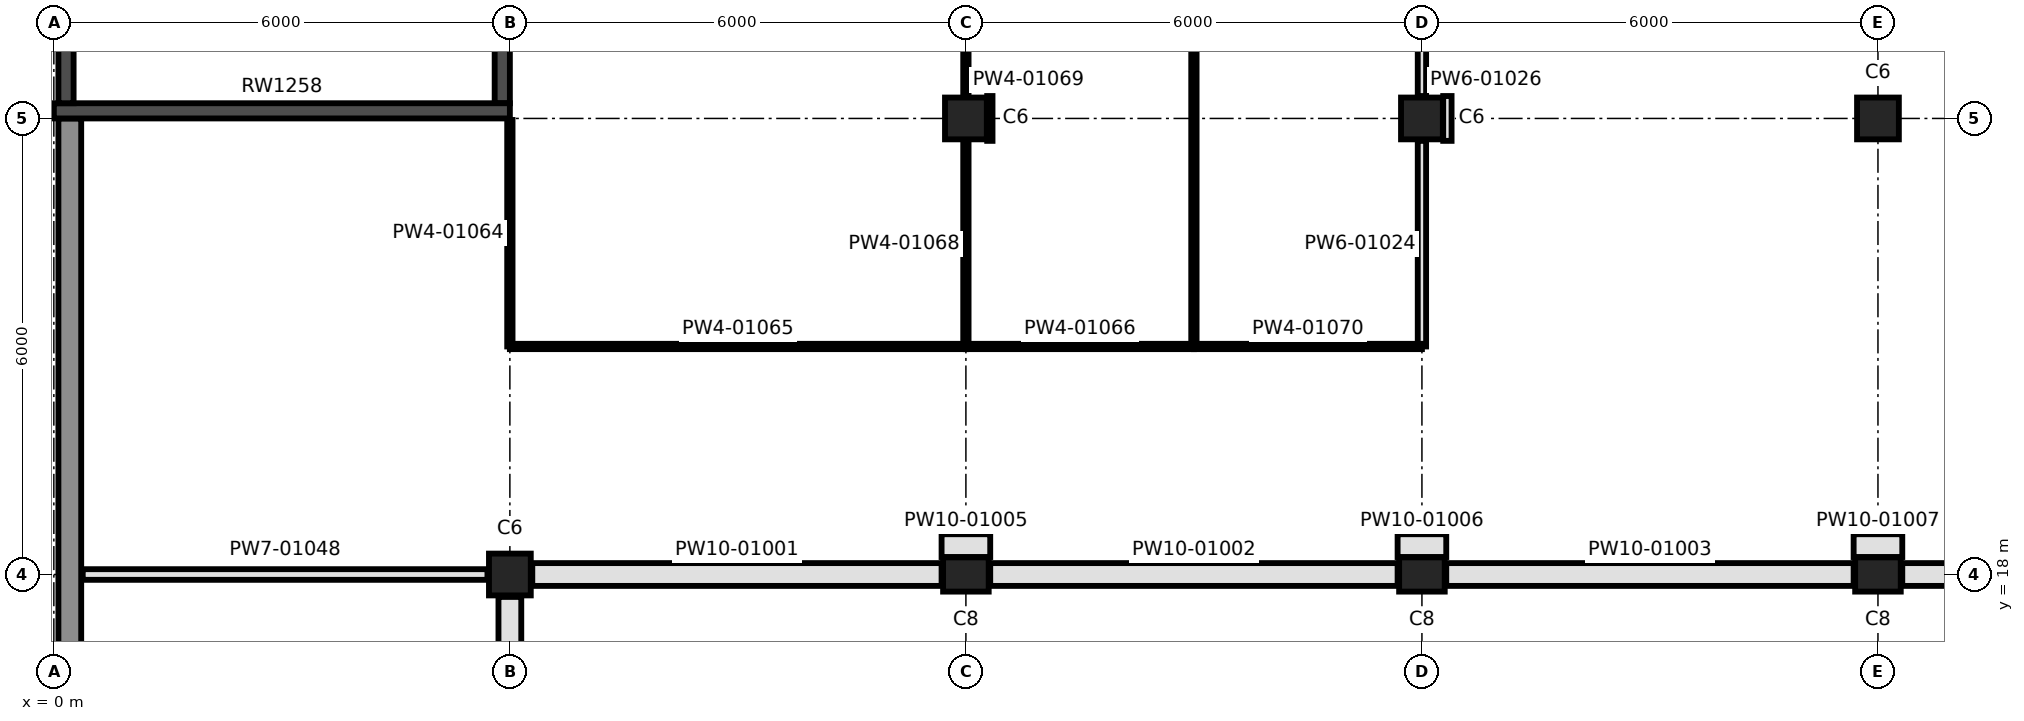
"""IFC4 building model, lengths in metres.
Left out: names, types, materials, properties, quantities, classifications, styles, units other than length and angle.
Written with IfcOpenShell. Run it as: python <this file> out.ifc"""

import sys

from ifc_helpers import new_model, si_unit, direction, frame, frame_2d, origin, origin_2d, place, context, subcontext, project, spatial, rectangle, extrude, element, fill, save


model = new_model("IFC4")
c1 = context("Model", 3, precision=1e-05, world=origin(), true_north=direction((0.0, 1.0)))
c2 = subcontext(c1, "Body", "Model", "MODEL_VIEW")
j1 = project(units=[si_unit("LENGTHUNIT", "METRE"), si_unit("PLANEANGLEUNIT", "RADIAN")], contexts=[c1])
p1 = place(None, origin())
s1 = spatial("IfcSite", under=j1, at=p1, CompositionType="ELEMENT")
p2 = place(p1, origin())
s2 = spatial("IfcBuilding", under=s1, at=p2, CompositionType="ELEMENT")
p3 = place(p2, frame((0.0, 0.0, 7.0)))
s3 = spatial("IfcBuildingStorey", under=s2, at=p3, CompositionType="ELEMENT", Elevation=7.0)
p4 = place(p3, frame((6.0, 18.0, 0.0), z_axis=(0.0, 0.0, 1.0), x_axis=(1.0, 0.0, 0.0)))
e1 = element("IfcColumn", 1, at=p4, inside=s3, PredefinedType="COLUMN", context=c2, shape_type="SweptSolid", body=[
    extrude(rectangle(XDim=0.55, YDim=0.55, at=origin_2d()), origin(), (0.0, 0.0, 1.0), 5.0),
])
for number, where, z_axis, x_axis in (
    (2, (12.0, 18.0, 0.0), (0.0, 0.0, 1.0), (1.0, 0.0, 0.0)),
    (3, (18.0, 18.0, 0.0), (0.0, 0.0, 1.0), (1.0, 0.0, 0.0)),
    (4, (24.0, 18.0, 0.0), (0.0, 0.0, 1.0), (1.0, 0.0, 0.0)),
):
    element("IfcColumn", number, at=place(p3, frame(where, z_axis=z_axis, x_axis=x_axis)), inside=s3, PredefinedType="COLUMN", context=c2, shape_type="SweptSolid", body=[
        extrude(rectangle(XDim=0.6, YDim=0.45, at=origin_2d()), origin(), (0.0, 0.0, 1.0), 5.0),
    ])
for number, where, z_axis, x_axis in (
    (5, (12.0, 24.0, 0.0), (0.0, 0.0, 1.0), (1.0, 0.0, 0.0)),
    (6, (18.0, 24.0, 0.0), (0.0, 0.0, 1.0), (1.0, 0.0, 0.0)),
    (7, (24.0, 24.0, 0.0), (0.0, 0.0, 1.0), (1.0, 0.0, 0.0)),
):
    element("IfcColumn", number, at=place(p3, frame(where, z_axis=z_axis, x_axis=x_axis)), inside=s3, PredefinedType="COLUMN", context=c2, shape_type="SweptSolid", body=[
        extrude(rectangle(XDim=0.55, YDim=0.55, at=origin_2d()), origin(), (0.0, 0.0, 1.0), 5.0),
    ])
p5 = place(p3, frame((0.0, 24.1, 0.0), z_axis=(0.0, 0.0, 1.0), x_axis=(1.0, 0.0, 0.0)))
e8 = element("IfcWall", 8, at=p5, inside=s3, PredefinedType="SHEAR", context=c2, shape_type="SweptSolid", body=[
    extrude(rectangle(XDim=6.0, YDim=0.2, at=frame_2d((3.0, 0.0))), origin(), (0.0, 0.0, 1.0), 5.0),
])
p6 = place(p5, frame((4.6, 0.0, 0.0)))
e9 = element("IfcOpeningElement", 9, at=p6, cuts=e8, PredefinedType="OPENING", context=c2, shape_type="SweptSolid", body=[
    extrude(rectangle(XDim=1.1, YDim=2.2, at=frame_2d((0.55, 1.1))), frame((0.0, 0.11, 0.0), z_axis=(0.0, -1.0, 0.0), x_axis=(1.0, 0.0, 0.0)), (0.0, 0.0, 1.0), 0.22),
])
p7 = place(p3, frame((0.16, 24.2, 0.0), z_axis=(0.0, 0.0, 1.0), x_axis=(0.0, 1.0, 0.0)))
e10 = element("IfcWall", 10, at=p7, inside=s3, PredefinedType="SHEAR", context=c2, shape_type="SweptSolid", body=[
    extrude(rectangle(XDim=5.6, YDim=0.2, at=frame_2d((2.8, 0.0))), origin(), (0.0, 0.0, 1.0), 5.0),
])
p8 = place(p7, frame((2.55, 0.0, 0.9)))
e11 = element("IfcOpeningElement", 11, at=p8, cuts=e10, PredefinedType="OPENING", context=c2, shape_type="SweptSolid", body=[
    extrude(rectangle(XDim=0.5, YDim=2.1, at=frame_2d((0.25, 1.05))), frame((0.0, 0.11, 0.0), z_axis=(0.0, -1.0, 0.0), x_axis=(1.0, 0.0, 0.0)), (0.0, 0.0, 1.0), 0.22),
])
p9 = place(p3, frame((5.9, 24.2, 0.0), z_axis=(0.0, 0.0, 1.0), x_axis=(0.0, 1.0, 0.0)))
e12 = element("IfcWall", 12, at=p9, inside=s3, PredefinedType="SHEAR", context=c2, shape_type="SweptSolid", body=[
    extrude(rectangle(XDim=5.6, YDim=0.2, at=frame_2d((2.8, 0.0))), origin(), (0.0, 0.0, 1.0), 5.0),
])
p10 = place(p3, frame((0.21, 6.0, 0.0), z_axis=(0.0, 0.0, 1.0), x_axis=(0.0, 1.0, 0.0)))
e13 = element("IfcWall", 13, at=p10, inside=s3, PredefinedType="SOLIDWALL", context=c2, shape_type="SweptSolid", body=[
    extrude(rectangle(XDim=18.0, YDim=0.3, at=frame_2d((9.0, 0.0))), origin(), (0.0, 0.0, 1.0), 5.0),
])
p11 = place(p3, frame((6.295, 18.0, 0.0), z_axis=(0.0, 0.0, 1.0), x_axis=(1.0, 0.0, 0.0)))
e14 = element("IfcWall", 14, at=p11, inside=s3, PredefinedType="PARTITIONING", context=c2, shape_type="SweptSolid", body=[
    extrude(rectangle(XDim=5.385, YDim=0.3, at=frame_2d((2.692, 0.0))), origin(), (0.0, 0.0, 1.0), 4.1),
])
p12 = place(p11, frame((1.755, 0.0, 0.0)))
e15 = element("IfcOpeningElement", 15, at=p12, cuts=e14, PredefinedType="OPENING", context=c2, shape_type="SweptSolid", body=[
    extrude(rectangle(XDim=1.8, YDim=2.1, at=frame_2d((0.9, 1.05))), frame((0.0, 0.16, 0.0), z_axis=(0.0, -1.0, 0.0), x_axis=(1.0, 0.0, 0.0)), (0.0, 0.0, 1.0), 0.32),
])
p13 = place(p3, frame((12.32, 18.0, 0.0), z_axis=(0.0, 0.0, 1.0), x_axis=(1.0, 0.0, 0.0)))
e16 = element("IfcWall", 16, at=p13, inside=s3, PredefinedType="PARTITIONING", context=c2, shape_type="SweptSolid", body=[
    extrude(rectangle(XDim=5.36, YDim=0.3, at=frame_2d((2.68, 0.0))), origin(), (0.0, 0.0, 1.0), 4.1),
])
p14 = place(p13, frame((1.73, 0.0, 0.0)))
e17 = element("IfcOpeningElement", 17, at=p14, cuts=e16, PredefinedType="OPENING", context=c2, shape_type="SweptSolid", body=[
    extrude(rectangle(XDim=1.8, YDim=2.1, at=frame_2d((0.9, 1.05))), frame((0.0, 0.16, 0.0), z_axis=(0.0, -1.0, 0.0), x_axis=(1.0, 0.0, 0.0)), (0.0, 0.0, 1.0), 0.32),
])
p15 = place(p3, frame((18.32, 18.0, 0.0), z_axis=(0.0, 0.0, 1.0), x_axis=(1.0, 0.0, 0.0)))
e18 = element("IfcWall", 18, at=p15, inside=s3, PredefinedType="PARTITIONING", context=c2, shape_type="SweptSolid", body=[
    extrude(rectangle(XDim=5.36, YDim=0.3, at=frame_2d((2.68, 0.0))), origin(), (0.0, 0.0, 1.0), 4.1),
])
p16 = place(p15, frame((1.73, 0.0, 0.0)))
e19 = element("IfcOpeningElement", 19, at=p16, cuts=e18, PredefinedType="OPENING", context=c2, shape_type="SweptSolid", body=[
    extrude(rectangle(XDim=1.8, YDim=2.1, at=frame_2d((0.9, 1.05))), frame((0.0, 0.16, 0.0), z_axis=(0.0, -1.0, 0.0), x_axis=(1.0, 0.0, 0.0)), (0.0, 0.0, 1.0), 0.32),
])
p17 = place(p3, frame((24.32, 18.0, 0.0), z_axis=(0.0, 0.0, 1.0), x_axis=(1.0, 0.0, 0.0)))
e20 = element("IfcWall", 20, at=p17, inside=s3, PredefinedType="PARTITIONING", context=c2, shape_type="SweptSolid", body=[
    extrude(rectangle(XDim=5.385, YDim=0.3, at=frame_2d((2.692, 0.0))), origin(), (0.0, 0.0, 1.0), 4.1),
])
p18 = place(p17, frame((1.73, 0.0, 0.0)))
e21 = element("IfcOpeningElement", 21, at=p18, cuts=e20, PredefinedType="OPENING", context=c2, shape_type="SweptSolid", body=[
    extrude(rectangle(XDim=1.8, YDim=2.1, at=frame_2d((0.9, 1.05))), frame((0.0, 0.16, 0.0), z_axis=(0.0, -1.0, 0.0), x_axis=(1.0, 0.0, 0.0)), (0.0, 0.0, 1.0), 0.32),
])
for number, where, z_axis, x_axis in (
    (22, (11.68, 18.38, 0.0), (0.0, 0.0, 1.0), (1.0, 0.0, 0.0)),
    (23, (17.68, 18.38, 0.0), (0.0, 0.0, 1.0), (1.0, 0.0, 0.0)),
    (24, (23.68, 18.38, 0.0), (0.0, 0.0, 1.0), (1.0, 0.0, 0.0)),
):
    element("IfcWall", number, at=place(p3, frame(where, z_axis=z_axis, x_axis=x_axis)), inside=s3, PredefinedType="PARTITIONING", context=c2, shape_type="SweptSolid", body=[
        extrude(rectangle(XDim=0.64, YDim=0.3, at=frame_2d((0.32, 0.0))), origin(), (0.0, 0.0, 1.0), 4.05),
    ])
p19 = place(p3, frame((6.0, 6.02, 0.0), z_axis=(0.0, 0.0, 1.0), x_axis=(0.0, 1.0, 0.0)))
e25 = element("IfcWall", 25, at=p19, inside=s3, PredefinedType="PARTITIONING", context=c2, shape_type="SweptSolid", body=[
    extrude(rectangle(XDim=11.685, YDim=0.3, at=frame_2d((5.843, 0.0))), origin(), (0.0, 0.0, 1.0), 4.1),
])
p20 = place(p19, frame((2.03, 0.0, 0.0)))
e26 = element("IfcOpeningElement", 26, at=p20, cuts=e25, PredefinedType="OPENING", context=c2, shape_type="SweptSolid", body=[
    extrude(rectangle(XDim=1.8, YDim=2.1, at=frame_2d((0.9, 1.05))), frame((0.0, 0.16, 0.0), z_axis=(0.0, -1.0, 0.0), x_axis=(1.0, 0.0, 0.0)), (0.0, 0.0, 1.0), 0.32),
])
p21 = place(p19, frame((8.03, 0.0, 0.0)))
e27 = element("IfcOpeningElement", 27, at=p21, cuts=e25, PredefinedType="OPENING", context=c2, shape_type="SweptSolid", body=[
    extrude(rectangle(XDim=1.8, YDim=2.1, at=frame_2d((0.9, 1.05))), frame((0.0, 0.16, 0.0), z_axis=(0.0, -1.0, 0.0), x_axis=(1.0, 0.0, 0.0)), (0.0, 0.0, 1.0), 0.32),
])
p22 = place(p3, frame((18.0, 21.0, 0.0), z_axis=(0.0, 0.0, 1.0), x_axis=(0.0, 1.0, 0.0)))
e28 = element("IfcWall", 28, at=p22, inside=s3, PredefinedType="PARTITIONING", context=c2, shape_type="SweptSolid", body=[
    extrude(rectangle(XDim=2.705, YDim=0.11, at=frame_2d((1.353, 0.0))), origin(), (0.0, 0.0, 1.0), 4.05),
])
p23 = place(p3, frame((18.0, 24.295, 0.0), z_axis=(0.0, 0.0, 1.0), x_axis=(0.0, 1.0, 0.0)))
e29 = element("IfcWall", 29, at=p23, inside=s3, PredefinedType="PARTITIONING", context=c2, shape_type="SweptSolid", body=[
    extrude(rectangle(XDim=5.685, YDim=0.11, at=frame_2d((2.843, 0.0))), origin(), (0.0, 0.0, 1.0), 4.05),
])
p24 = place(p23, frame((0.755, 0.0, 0.0)))
e30 = element("IfcOpeningElement", 30, at=p24, cuts=e29, PredefinedType="OPENING", context=c2, shape_type="SweptSolid", body=[
    extrude(rectangle(XDim=0.92, YDim=2.04, at=frame_2d((0.46, 1.02))), frame((0.0, 0.065, 0.0), z_axis=(0.0, -1.0, 0.0), x_axis=(1.0, 0.0, 0.0)), (0.0, 0.0, 1.0), 0.13),
])
p25 = place(p3, frame((18.335, 23.705, 0.0), z_axis=(0.0, 0.0, 1.0), x_axis=(0.0, 1.0, 0.0)))
e31 = element("IfcWall", 31, at=p25, inside=s3, PredefinedType="PARTITIONING", context=c2, shape_type="SweptSolid", body=[
    extrude(rectangle(XDim=0.59, YDim=0.11, at=frame_2d((0.295, 0.0))), origin(), (0.0, 0.0, 1.0), 4.05),
])
p26 = place(p3, frame((0.38, 18.0, 0.0), z_axis=(0.0, 0.0, 1.0), x_axis=(1.0, 0.0, 0.0)))
e32 = element("IfcWall", 32, at=p26, inside=s3, PredefinedType="PARTITIONING", context=c2, shape_type="SweptSolid", body=[
    extrude(rectangle(XDim=5.325, YDim=0.14, at=frame_2d((2.663, 0.0))), origin(), (0.0, 0.0, 1.0), 4.05),
])
p27 = place(p26, frame((1.67, 0.0, 0.0)))
e33 = element("IfcOpeningElement", 33, at=p27, cuts=e32, PredefinedType="OPENING", context=c2, shape_type="SweptSolid", body=[
    extrude(rectangle(XDim=1.8, YDim=2.1, at=frame_2d((0.9, 1.05))), frame((0.0, 0.08, 0.0), z_axis=(0.0, -1.0, 0.0), x_axis=(1.0, 0.0, 0.0)), (0.0, 0.0, 1.0), 0.16),
])
p28 = place(p3, frame((6.0, 21.0, 0.0), z_axis=(0.0, 0.0, 1.0), x_axis=(0.0, 1.0, 0.0)))
e34 = element("IfcWall", 34, at=p28, inside=s3, PredefinedType="PARTITIONING", context=c2, shape_type="SweptSolid", body=[
    extrude(rectangle(XDim=2.98, YDim=0.07, at=frame_2d((1.49, 0.0))), origin(), (0.0, 0.0, 1.0), 4.05),
])
p29 = place(p3, frame((6.0, 21.0, 0.0), z_axis=(0.0, 0.0, 1.0), x_axis=(1.0, 0.0, 0.0)))
e35 = element("IfcWall", 35, at=p29, inside=s3, PredefinedType="PARTITIONING", context=c2, shape_type="SweptSolid", body=[
    extrude(rectangle(XDim=6.0, YDim=0.07, at=frame_2d((3.0, 0.0))), origin(), (0.0, 0.0, 1.0), 4.05),
])
p30 = place(p29, frame((2.25, 0.0, 0.0)))
e36 = element("IfcOpeningElement", 36, at=p30, cuts=e35, PredefinedType="OPENING", context=c2, shape_type="SweptSolid", body=[
    extrude(rectangle(XDim=1.5, YDim=2.1, at=frame_2d((0.75, 1.05))), frame((0.0, 0.045, 0.0), z_axis=(0.0, -1.0, 0.0), x_axis=(1.0, 0.0, 0.0)), (0.0, 0.0, 1.0), 0.09),
])
p31 = place(p3, frame((12.0, 21.0, 0.0), z_axis=(0.0, 0.0, 1.0), x_axis=(1.0, 0.0, 0.0)))
e37 = element("IfcWall", 37, at=p31, inside=s3, PredefinedType="PARTITIONING", context=c2, shape_type="SweptSolid", body=[
    extrude(rectangle(XDim=3.0, YDim=0.07, at=frame_2d((1.5, 0.0))), origin(), (0.0, 0.0, 1.0), 4.05),
])
p32 = place(p3, frame((12.0, 24.295, 0.0), z_axis=(0.0, 0.0, 1.0), x_axis=(0.0, 1.0, 0.0)))
e38 = element("IfcWall", 38, at=p32, inside=s3, PredefinedType="PARTITIONING", context=c2, shape_type="SweptSolid", body=[
    extrude(rectangle(XDim=5.41, YDim=0.07, at=frame_2d((2.705, 0.0))), origin(), (0.0, 0.0, 1.0), 4.05),
])
p33 = place(p3, frame((12.0, 21.0, 0.0), z_axis=(0.0, 0.0, 1.0), x_axis=(0.0, 1.0, 0.0)))
e39 = element("IfcWall", 39, at=p33, inside=s3, PredefinedType="PARTITIONING", context=c2, shape_type="SweptSolid", body=[
    extrude(rectangle(XDim=2.705, YDim=0.07, at=frame_2d((1.353, 0.0))), origin(), (0.0, 0.0, 1.0), 4.05),
])
p34 = place(p3, frame((12.315, 23.705, 0.0), z_axis=(0.0, 0.0, 1.0), x_axis=(0.0, 1.0, 0.0)))
e40 = element("IfcWall", 40, at=p34, inside=s3, PredefinedType="PARTITIONING", context=c2, shape_type="SweptSolid", body=[
    extrude(rectangle(XDim=0.59, YDim=0.07, at=frame_2d((0.295, 0.0))), origin(), (0.0, 0.0, 1.0), 4.05),
])
p35 = place(p3, frame((15.0, 21.0, 0.0), z_axis=(0.0, 0.0, 1.0), x_axis=(1.0, 0.0, 0.0)))
e41 = element("IfcWall", 41, at=p35, inside=s3, PredefinedType="PARTITIONING", context=c2, shape_type="SweptSolid", body=[
    extrude(rectangle(XDim=3.0, YDim=0.07, at=frame_2d((1.5, 0.0))), origin(), (0.0, 0.0, 1.0), 4.05),
])
p36 = place(p3, frame((15.0, 21.0, 0.0), z_axis=(0.0, 0.0, 1.0), x_axis=(0.0, 1.0, 0.0)))
e42 = element("IfcWall", 42, at=p36, inside=s3, PredefinedType="PARTITIONING", context=c2, shape_type="SweptSolid", body=[
    extrude(rectangle(XDim=9.0, YDim=0.07, at=frame_2d((4.5, 0.0))), origin(), (0.0, 0.0, 1.0), 4.05),
])
p37 = place(p12, origin())
e43 = element("IfcDoor", 43, at=p37, inside=s3, OperationType="DOUBLE_DOOR_SINGLE_SWING", PredefinedType="DOOR", context=c2, shape_type="SweptSolid", body=[
    extrude(rectangle(XDim=1.8, YDim=2.1, at=frame_2d((0.9, 1.05))), frame((0.0, 0.025, 0.0), z_axis=(0.0, -1.0, 0.0), x_axis=(1.0, 0.0, 0.0)), (0.0, 0.0, 1.0), 0.05),
])
fill(e15, e43)
p38 = place(p14, origin())
e44 = element("IfcDoor", 44, at=p38, inside=s3, OperationType="DOUBLE_DOOR_SINGLE_SWING", PredefinedType="DOOR", context=c2, shape_type="SweptSolid", body=[
    extrude(rectangle(XDim=1.8, YDim=2.1, at=frame_2d((0.9, 1.05))), frame((0.0, 0.025, 0.0), z_axis=(0.0, -1.0, 0.0), x_axis=(1.0, 0.0, 0.0)), (0.0, 0.0, 1.0), 0.05),
])
fill(e17, e44)
p39 = place(p16, origin())
e45 = element("IfcDoor", 45, at=p39, inside=s3, OperationType="DOUBLE_DOOR_SINGLE_SWING", PredefinedType="DOOR", context=c2, shape_type="SweptSolid", body=[
    extrude(rectangle(XDim=1.8, YDim=2.1, at=frame_2d((0.9, 1.05))), frame((0.0, 0.025, 0.0), z_axis=(0.0, -1.0, 0.0), x_axis=(1.0, 0.0, 0.0)), (0.0, 0.0, 1.0), 0.05),
])
fill(e19, e45)
p40 = place(p30, origin())
e46 = element("IfcDoor", 46, at=p40, inside=s3, OperationType="DOUBLE_DOOR_SINGLE_SWING", PredefinedType="DOOR", context=c2, shape_type="SweptSolid", body=[
    extrude(rectangle(XDim=1.5, YDim=2.1, at=frame_2d((0.75, 1.05))), frame((0.0, 0.025, 0.0), z_axis=(0.0, -1.0, 0.0), x_axis=(1.0, 0.0, 0.0)), (0.0, 0.0, 1.0), 0.05),
])
fill(e36, e46)
p41 = place(p6, origin())
e47 = element("IfcDoor", 47, at=p41, inside=s3, OperationType="SINGLE_SWING_LEFT", PredefinedType="DOOR", context=c2, shape_type="SweptSolid", body=[
    extrude(rectangle(XDim=1.1, YDim=2.2, at=frame_2d((0.55, 1.1))), frame((0.0, 0.025, 0.0), z_axis=(0.0, -1.0, 0.0), x_axis=(1.0, 0.0, 0.0)), (0.0, 0.0, 1.0), 0.05),
])
fill(e9, e47)
p42 = place(p27, frame((1.8, 0.0, 0.0), z_axis=(0.0, 0.0, 1.0), x_axis=(-1.0, 0.0, 0.0)))
e48 = element("IfcDoor", 48, at=p42, inside=s3, OperationType="DOUBLE_DOOR_SINGLE_SWING", PredefinedType="DOOR", context=c2, shape_type="SweptSolid", body=[
    extrude(rectangle(XDim=1.8, YDim=2.1, at=frame_2d((0.9, 1.05))), frame((0.0, 0.025, 0.0), z_axis=(0.0, -1.0, 0.0), x_axis=(1.0, 0.0, 0.0)), (0.0, 0.0, 1.0), 0.05),
])
fill(e33, e48)
save(model, sys.argv[1])
